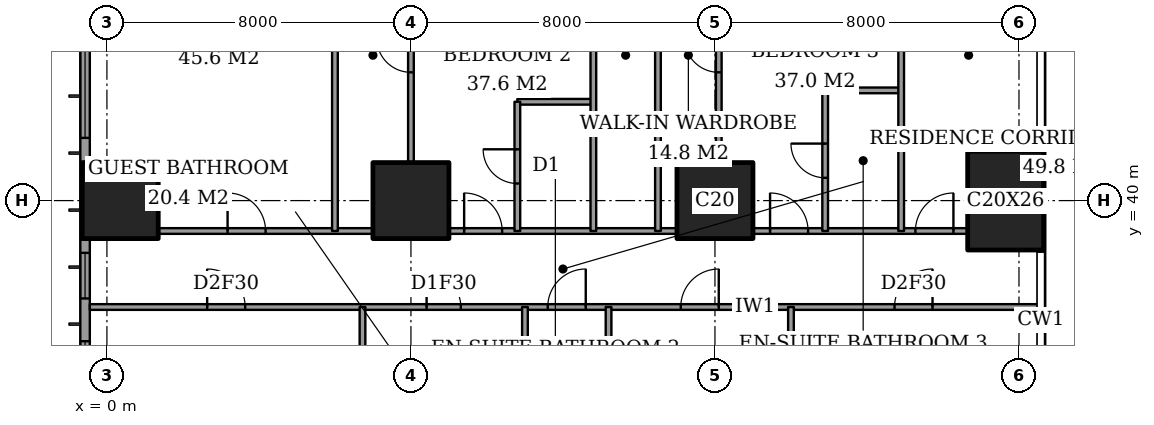
"""IFC4 building model, lengths in metres.
Left out: names, types, materials, properties, quantities, classifications, styles, units other than length and angle.
Written with IfcOpenShell. Run it as: python <this file> out.ifc"""

import sys

from ifc_helpers import new_model, si_unit, direction, frame, frame_2d, origin, origin_2d, place, context, subcontext, project, spatial, rectangle, extrude, element, fill, save


model = new_model("IFC4")
c1 = context("Model", 3, precision=1e-05, world=origin(), true_north=direction((0.0, 1.0)))
c2 = subcontext(c1, "Body", "Model", "MODEL_VIEW")
j1 = project(units=[si_unit("LENGTHUNIT", "METRE"), si_unit("PLANEANGLEUNIT", "RADIAN")], contexts=[c1])
p1 = place(None, origin())
s1 = spatial("IfcSite", under=j1, at=p1, CompositionType="ELEMENT")
p2 = place(p1, origin())
s2 = spatial("IfcBuilding", under=s1, at=p2, CompositionType="ELEMENT")
p3 = place(p2, frame((0.0, 0.0, 114.2)))
s3 = spatial("IfcBuildingStorey", under=s2, at=p3, CompositionType="ELEMENT", Elevation=114.2)
for number, where, z_axis, x_axis in (
    (1, (0.35, 40.0, 0.0), (0.0, 0.0, 1.0), (1.0, 0.0, 0.0)),
    (2, (8.0, 40.0, 0.0), (0.0, 0.0, 1.0), (1.0, 0.0, 0.0)),
    (3, (16.0, 40.0, 0.0), (0.0, 0.0, 1.0), (1.0, 0.0, 0.0)),
):
    element("IfcColumn", number, at=place(p3, frame(where, z_axis=z_axis, x_axis=x_axis)), inside=s3, PredefinedType="COLUMN", context=c2, shape_type="SweptSolid", body=[
        extrude(rectangle(XDim=2.0, YDim=2.0, at=origin_2d()), origin(), (0.0, 0.0, 1.0), 3.6),
    ])
p4 = place(p3, frame((23.65, 40.0, 0.0), z_axis=(0.0, 0.0, 1.0), x_axis=(1.0, 0.0, 0.0)))
e4 = element("IfcColumn", 4, at=p4, inside=s3, PredefinedType="COLUMN", context=c2, shape_type="SweptSolid", body=[
    extrude(rectangle(XDim=2.0, YDim=2.6, at=origin_2d()), origin(), (0.0, 0.0, 1.0), 3.6),
])
p5 = place(p3, frame((-0.575, 44.825, 0.0), z_axis=(0.0, 0.0, 1.0), x_axis=(0.0, -1.0, 0.0)))
e5 = element("IfcWall", 5, at=p5, inside=s3, PredefinedType="SOLIDWALL", context=c2, shape_type="SweptSolid", body=[
    extrude(rectangle(XDim=41.65, YDim=0.25, at=frame_2d((20.825, 0.0))), origin(), (0.0, 0.0, 1.0), 3.6),
])
p6 = place(p5, frame((0.775, 0.0, 0.4)))
e6 = element("IfcOpeningElement", 6, at=p6, cuts=e5, PredefinedType="OPENING", context=c2, shape_type="SweptSolid", body=[
    extrude(rectangle(XDim=2.4, YDim=2.2, at=frame_2d((1.2, 1.1))), frame((0.0, 0.135, 0.0), z_axis=(0.0, -1.0, 0.0), x_axis=(1.0, 0.0, 0.0)), (0.0, 0.0, 1.0), 0.27),
])
p7 = place(p5, frame((6.2, 0.0, 0.4)))
e7 = element("IfcOpeningElement", 7, at=p7, cuts=e5, PredefinedType="OPENING", context=c2, shape_type="SweptSolid", body=[
    extrude(rectangle(XDim=1.2, YDim=2.2, at=frame_2d((0.6, 1.1))), frame((0.0, 0.135, 0.0), z_axis=(0.0, -1.0, 0.0), x_axis=(1.0, 0.0, 0.0)), (0.0, 0.0, 1.0), 0.27),
])
p8 = place(p5, frame((8.525, 0.0, 0.4)))
e8 = element("IfcOpeningElement", 8, at=p8, cuts=e5, PredefinedType="OPENING", context=c2, shape_type="SweptSolid", body=[
    extrude(rectangle(XDim=2.4, YDim=2.2, at=frame_2d((1.2, 1.1))), frame((0.0, 0.135, 0.0), z_axis=(0.0, -1.0, 0.0), x_axis=(1.0, 0.0, 0.0)), (0.0, 0.0, 1.0), 0.27),
])
p9 = place(p5, frame((15.625, 0.0, 0.4)))
e9 = element("IfcOpeningElement", 9, at=p9, cuts=e5, PredefinedType="OPENING", context=c2, shape_type="SweptSolid", body=[
    extrude(rectangle(XDim=2.4, YDim=2.2, at=frame_2d((1.2, 1.1))), frame((0.0, 0.135, 0.0), z_axis=(0.0, -1.0, 0.0), x_axis=(1.0, 0.0, 0.0)), (0.0, 0.0, 1.0), 0.27),
])
p10 = place(p5, frame((23.625, 0.0, 0.4)))
e10 = element("IfcOpeningElement", 10, at=p10, cuts=e5, PredefinedType="OPENING", context=c2, shape_type="SweptSolid", body=[
    extrude(rectangle(XDim=2.4, YDim=2.2, at=frame_2d((1.2, 1.1))), frame((0.0, 0.135, 0.0), z_axis=(0.0, -1.0, 0.0), x_axis=(1.0, 0.0, 0.0)), (0.0, 0.0, 1.0), 0.27),
])
p11 = place(p5, frame((30.825, 0.0, 0.4)))
e11 = element("IfcOpeningElement", 11, at=p11, cuts=e5, PredefinedType="OPENING", context=c2, shape_type="SweptSolid", body=[
    extrude(rectangle(XDim=2.4, YDim=2.2, at=frame_2d((1.2, 1.1))), frame((0.0, 0.135, 0.0), z_axis=(0.0, -1.0, 0.0), x_axis=(1.0, 0.0, 0.0)), (0.0, 0.0, 1.0), 0.27),
])
p12 = place(p5, frame((34.5, 0.0, 0.4)))
e12 = element("IfcOpeningElement", 12, at=p12, cuts=e5, PredefinedType="OPENING", context=c2, shape_type="SweptSolid", body=[
    extrude(rectangle(XDim=1.2, YDim=2.2, at=frame_2d((0.6, 1.1))), frame((0.0, 0.135, 0.0), z_axis=(0.0, -1.0, 0.0), x_axis=(1.0, 0.0, 0.0)), (0.0, 0.0, 1.0), 0.27),
])
p13 = place(p5, frame((38.475, 0.0, 0.4)))
e13 = element("IfcOpeningElement", 13, at=p13, cuts=e5, PredefinedType="OPENING", context=c2, shape_type="SweptSolid", body=[
    extrude(rectangle(XDim=2.4, YDim=2.2, at=frame_2d((1.2, 1.1))), frame((0.0, 0.135, 0.0), z_axis=(0.0, -1.0, 0.0), x_axis=(1.0, 0.0, 0.0)), (0.0, 0.0, 1.0), 0.27),
])
p14 = place(p3, frame((-0.45, 37.2, 0.0), z_axis=(0.0, 0.0, 1.0), x_axis=(1.0, 0.0, 0.0)))
e14 = element("IfcWall", 14, at=p14, inside=s3, PredefinedType="PARTITIONING", context=c2, shape_type="SweptSolid", body=[
    extrude(rectangle(XDim=25.011, YDim=0.15, at=frame_2d((12.505, 0.0))), origin(), (0.0, 0.0, 1.0), 3.35),
])
p15 = place(p14, frame((12.05, 0.0, 0.0)))
e15 = element("IfcOpeningElement", 15, at=p15, cuts=e14, PredefinedType="OPENING", context=c2, shape_type="SweptSolid", body=[
    extrude(rectangle(XDim=1.0, YDim=2.1, at=frame_2d((0.5, 1.05))), frame((0.0, 0.085, 0.0), z_axis=(0.0, -1.0, 0.0), x_axis=(1.0, 0.0, 0.0)), (0.0, 0.0, 1.0), 0.17),
])
p16 = place(p14, frame((3.087, 0.0, 0.0)))
e16 = element("IfcOpeningElement", 16, at=p16, cuts=e14, PredefinedType="OPENING", context=c2, shape_type="SweptSolid", body=[
    extrude(rectangle(XDim=1.0, YDim=2.1, at=frame_2d((0.5, 1.05))), frame((0.0, 0.085, 0.0), z_axis=(0.0, -1.0, 0.0), x_axis=(1.0, 0.0, 0.0)), (0.0, 0.0, 1.0), 0.17),
])
p17 = place(p14, frame((8.863, 0.0, 0.0)))
e17 = element("IfcOpeningElement", 17, at=p17, cuts=e14, PredefinedType="OPENING", context=c2, shape_type="SweptSolid", body=[
    extrude(rectangle(XDim=0.9, YDim=2.1, at=frame_2d((0.45, 1.05))), frame((0.0, 0.085, 0.0), z_axis=(0.0, -1.0, 0.0), x_axis=(1.0, 0.0, 0.0)), (0.0, 0.0, 1.0), 0.17),
])
p18 = place(p14, frame((15.55, 0.0, 0.0)))
e18 = element("IfcOpeningElement", 18, at=p18, cuts=e14, PredefinedType="OPENING", context=c2, shape_type="SweptSolid", body=[
    extrude(rectangle(XDim=1.0, YDim=2.1, at=frame_2d((0.5, 1.05))), frame((0.0, 0.085, 0.0), z_axis=(0.0, -1.0, 0.0), x_axis=(1.0, 0.0, 0.0)), (0.0, 0.0, 1.0), 0.17),
])
p19 = place(p14, frame((21.175, 0.0, 0.0)))
e19 = element("IfcOpeningElement", 19, at=p19, cuts=e14, PredefinedType="OPENING", context=c2, shape_type="SweptSolid", body=[
    extrude(rectangle(XDim=1.0, YDim=2.1, at=frame_2d((0.5, 1.05))), frame((0.0, 0.085, 0.0), z_axis=(0.0, -1.0, 0.0), x_axis=(1.0, 0.0, 0.0)), (0.0, 0.0, 1.0), 0.17),
])
p20 = place(p3, frame((1.35, 39.2, 0.0), z_axis=(0.0, 0.0, 1.0), x_axis=(1.0, 0.0, 0.0)))
e20 = element("IfcWall", 20, at=p20, inside=s3, PredefinedType="PARTITIONING", context=c2, shape_type="SweptSolid", body=[
    extrude(rectangle(XDim=5.65, YDim=0.15, at=frame_2d((2.825, 0.0))), origin(), (0.0, 0.0, 1.0), 3.35),
])
p21 = place(p20, frame((1.825, 0.0, 0.0)))
e21 = element("IfcOpeningElement", 21, at=p21, cuts=e20, PredefinedType="OPENING", context=c2, shape_type="SweptSolid", body=[
    extrude(rectangle(XDim=1.0, YDim=2.1, at=frame_2d((0.5, 1.05))), frame((0.0, 0.085, 0.0), z_axis=(0.0, -1.0, 0.0), x_axis=(1.0, 0.0, 0.0)), (0.0, 0.0, 1.0), 0.17),
])
p22 = place(p3, frame((9.0, 39.2, 0.0), z_axis=(0.0, 0.0, 1.0), x_axis=(1.0, 0.0, 0.0)))
e22 = element("IfcWall", 22, at=p22, inside=s3, PredefinedType="PARTITIONING", context=c2, shape_type="SweptSolid", body=[
    extrude(rectangle(XDim=6.0, YDim=0.15, at=frame_2d((3.0, 0.0))), origin(), (0.0, 0.0, 1.0), 3.35),
])
p23 = place(p22, frame((0.4, 0.0, 0.0)))
e23 = element("IfcOpeningElement", 23, at=p23, cuts=e22, PredefinedType="OPENING", context=c2, shape_type="SweptSolid", body=[
    extrude(rectangle(XDim=1.0, YDim=2.1, at=frame_2d((0.5, 1.05))), frame((0.0, 0.085, 0.0), z_axis=(0.0, -1.0, 0.0), x_axis=(1.0, 0.0, 0.0)), (0.0, 0.0, 1.0), 0.17),
])
p24 = place(p3, frame((17.0, 39.2, 0.0), z_axis=(0.0, 0.0, 1.0), x_axis=(1.0, 0.0, 0.0)))
e24 = element("IfcWall", 24, at=p24, inside=s3, PredefinedType="PARTITIONING", context=c2, shape_type="SweptSolid", body=[
    extrude(rectangle(XDim=5.65, YDim=0.15, at=frame_2d((2.825, 0.0))), origin(), (0.0, 0.0, 1.0), 3.35),
])
p25 = place(p24, frame((0.45, 0.0, 0.0)))
e25 = element("IfcOpeningElement", 25, at=p25, cuts=e24, PredefinedType="OPENING", context=c2, shape_type="SweptSolid", body=[
    extrude(rectangle(XDim=1.0, YDim=2.1, at=frame_2d((0.5, 1.05))), frame((0.0, 0.085, 0.0), z_axis=(0.0, -1.0, 0.0), x_axis=(1.0, 0.0, 0.0)), (0.0, 0.0, 1.0), 0.17),
])
p26 = place(p24, frame((4.275, 0.0, 0.0)))
e26 = element("IfcOpeningElement", 26, at=p26, cuts=e24, PredefinedType="OPENING", context=c2, shape_type="SweptSolid", body=[
    extrude(rectangle(XDim=1.0, YDim=2.1, at=frame_2d((0.5, 1.05))), frame((0.0, 0.085, 0.0), z_axis=(0.0, -1.0, 0.0), x_axis=(1.0, 0.0, 0.0)), (0.0, 0.0, 1.0), 0.17),
])
for number, where, z_axis, x_axis in (
    (27, (10.8, 42.6, 0.0), (0.0, 0.0, 1.0), (1.0, 0.0, 0.0)),
    (28, (18.9, 42.9, 0.0), (0.0, 0.0, 1.0), (1.0, 0.0, 0.0)),
):
    element("IfcWall", number, at=place(p3, frame(where, z_axis=z_axis, x_axis=x_axis)), inside=s3, PredefinedType="PARTITIONING", context=c2, shape_type="SweptSolid", body=[
        extrude(rectangle(XDim=2.0, YDim=0.15, at=frame_2d((1.0, 0.0))), origin(), (0.0, 0.0, 1.0), 3.35),
    ])
p27 = place(p3, frame((6.0, 39.2, 0.0), z_axis=(0.0, 0.0, 1.0), x_axis=(0.0, 1.0, 0.0)))
e29 = element("IfcWall", 29, at=p27, inside=s3, PredefinedType="PARTITIONING", context=c2, shape_type="SweptSolid", body=[
    extrude(rectangle(XDim=9.25, YDim=0.15, at=frame_2d((4.625, 0.0))), origin(), (0.0, 0.0, 1.0), 3.35),
])
p28 = place(p3, frame((6.725, 33.2, 0.0), z_axis=(0.0, 0.0, 1.0), x_axis=(0.0, 1.0, 0.0)))
e30 = element("IfcWall", 30, at=p28, inside=s3, PredefinedType="PARTITIONING", context=c2, shape_type="SweptSolid", body=[
    extrude(rectangle(XDim=4.0, YDim=0.15, at=frame_2d((2.0, 0.0))), origin(), (0.0, 0.0, 1.0), 3.35),
])
p29 = place(p3, frame((8.0, 41.0, 0.0), z_axis=(0.0, 0.0, 1.0), x_axis=(0.0, 1.0, 0.0)))
e31 = element("IfcWall", 31, at=p29, inside=s3, PredefinedType="PARTITIONING", context=c2, shape_type="SweptSolid", body=[
    extrude(rectangle(XDim=5.65, YDim=0.15, at=frame_2d((2.825, 0.0))), origin(), (0.0, 0.0, 1.0), 3.35),
])
p30 = place(p29, frame((2.375, 0.0, 0.0)))
e32 = element("IfcOpeningElement", 32, at=p30, cuts=e31, PredefinedType="OPENING", context=c2, shape_type="SweptSolid", body=[
    extrude(rectangle(XDim=0.9, YDim=2.1, at=frame_2d((0.45, 1.05))), frame((0.0, 0.085, 0.0), z_axis=(0.0, -1.0, 0.0), x_axis=(1.0, 0.0, 0.0)), (0.0, 0.0, 1.0), 0.17),
])
p31 = place(p3, frame((10.8, 39.2, 0.0), z_axis=(0.0, 0.0, 1.0), x_axis=(0.0, 1.0, 0.0)))
e33 = element("IfcWall", 33, at=p31, inside=s3, PredefinedType="PARTITIONING", context=c2, shape_type="SweptSolid", body=[
    extrude(rectangle(XDim=3.4, YDim=0.15, at=frame_2d((1.7, 0.0))), origin(), (0.0, 0.0, 1.0), 3.35),
])
p32 = place(p31, frame((1.25, 0.0, 0.0)))
e34 = element("IfcOpeningElement", 34, at=p32, cuts=e33, PredefinedType="OPENING", context=c2, shape_type="SweptSolid", body=[
    extrude(rectangle(XDim=0.9, YDim=2.1, at=frame_2d((0.45, 1.05))), frame((0.0, 0.085, 0.0), z_axis=(0.0, -1.0, 0.0), x_axis=(1.0, 0.0, 0.0)), (0.0, 0.0, 1.0), 0.17),
])
p33 = place(p3, frame((11.0, 28.0, 0.0), z_axis=(0.0, 0.0, 1.0), x_axis=(0.0, 1.0, 0.0)))
e35 = element("IfcWall", 35, at=p33, inside=s3, PredefinedType="PARTITIONING", context=c2, shape_type="SweptSolid", body=[
    extrude(rectangle(XDim=9.2, YDim=0.15, at=frame_2d((4.6, 0.0))), origin(), (0.0, 0.0, 1.0), 3.35),
])
p34 = place(p33, frame((0.837, 0.0, 0.0)))
e36 = element("IfcOpeningElement", 36, at=p34, cuts=e35, PredefinedType="OPENING", context=c2, shape_type="SweptSolid", body=[
    extrude(rectangle(XDim=1.0, YDim=2.1, at=frame_2d((0.5, 1.05))), frame((0.0, 0.085, 0.0), z_axis=(0.0, -1.0, 0.0), x_axis=(1.0, 0.0, 0.0)), (0.0, 0.0, 1.0), 0.17),
])
p35 = place(p3, frame((12.8, 39.2, 0.0), z_axis=(0.0, 0.0, 1.0), x_axis=(0.0, 1.0, 0.0)))
e37 = element("IfcWall", 37, at=p35, inside=s3, PredefinedType="PARTITIONING", context=c2, shape_type="SweptSolid", body=[
    extrude(rectangle(XDim=9.25, YDim=0.15, at=frame_2d((4.625, 0.0))), origin(), (0.0, 0.0, 1.0), 3.35),
])
p36 = place(p35, frame((5.875, 0.0, 0.0)))
e38 = element("IfcOpeningElement", 38, at=p36, cuts=e37, PredefinedType="OPENING", context=c2, shape_type="SweptSolid", body=[
    extrude(rectangle(XDim=0.9, YDim=2.1, at=frame_2d((0.45, 1.05))), frame((0.0, 0.085, 0.0), z_axis=(0.0, -1.0, 0.0), x_axis=(1.0, 0.0, 0.0)), (0.0, 0.0, 1.0), 0.17),
])
p37 = place(p3, frame((13.2, 30.675, 0.0), z_axis=(0.0, 0.0, 1.0), x_axis=(0.0, 1.0, 0.0)))
e39 = element("IfcWall", 39, at=p37, inside=s3, PredefinedType="PARTITIONING", context=c2, shape_type="SweptSolid", body=[
    extrude(rectangle(XDim=6.525, YDim=0.15, at=frame_2d((3.262, 0.0))), origin(), (0.0, 0.0, 1.0), 3.35),
])
p38 = place(p3, frame((14.5, 39.2, 0.0), z_axis=(0.0, 0.0, 1.0), x_axis=(0.0, 1.0, 0.0)))
e40 = element("IfcWall", 40, at=p38, inside=s3, PredefinedType="PARTITIONING", context=c2, shape_type="SweptSolid", body=[
    extrude(rectangle(XDim=9.25, YDim=0.15, at=frame_2d((4.625, 0.0))), origin(), (0.0, 0.0, 1.0), 3.35),
])
p39 = place(p3, frame((16.1, 41.0, 0.0), z_axis=(0.0, 0.0, 1.0), x_axis=(0.0, 1.0, 0.0)))
e41 = element("IfcWall", 41, at=p39, inside=s3, PredefinedType="PARTITIONING", context=c2, shape_type="SweptSolid", body=[
    extrude(rectangle(XDim=5.65, YDim=0.15, at=frame_2d((2.825, 0.0))), origin(), (0.0, 0.0, 1.0), 3.35),
])
p40 = place(p39, frame((2.375, 0.0, 0.0)))
e42 = element("IfcOpeningElement", 42, at=p40, cuts=e41, PredefinedType="OPENING", context=c2, shape_type="SweptSolid", body=[
    extrude(rectangle(XDim=0.9, YDim=2.1, at=frame_2d((0.45, 1.05))), frame((0.0, 0.085, 0.0), z_axis=(0.0, -1.0, 0.0), x_axis=(1.0, 0.0, 0.0)), (0.0, 0.0, 1.0), 0.17),
])
p41 = place(p3, frame((18.0, 28.0, 0.0), z_axis=(0.0, 0.0, 1.0), x_axis=(0.0, 1.0, 0.0)))
e43 = element("IfcWall", 43, at=p41, inside=s3, PredefinedType="PARTITIONING", context=c2, shape_type="SweptSolid", body=[
    extrude(rectangle(XDim=9.2, YDim=0.15, at=frame_2d((4.6, 0.0))), origin(), (0.0, 0.0, 1.0), 3.35),
])
p42 = place(p41, frame((0.837, 0.0, 0.0)))
e44 = element("IfcOpeningElement", 44, at=p42, cuts=e43, PredefinedType="OPENING", context=c2, shape_type="SweptSolid", body=[
    extrude(rectangle(XDim=1.0, YDim=2.1, at=frame_2d((0.5, 1.05))), frame((0.0, 0.085, 0.0), z_axis=(0.0, -1.0, 0.0), x_axis=(1.0, 0.0, 0.0)), (0.0, 0.0, 1.0), 0.17),
])
p43 = place(p3, frame((18.9, 39.2, 0.0), z_axis=(0.0, 0.0, 1.0), x_axis=(0.0, 1.0, 0.0)))
e45 = element("IfcWall", 45, at=p43, inside=s3, PredefinedType="PARTITIONING", context=c2, shape_type="SweptSolid", body=[
    extrude(rectangle(XDim=3.7, YDim=0.15, at=frame_2d((1.85, 0.0))), origin(), (0.0, 0.0, 1.0), 3.35),
])
p44 = place(p43, frame((1.4, 0.0, 0.0)))
e46 = element("IfcOpeningElement", 46, at=p44, cuts=e45, PredefinedType="OPENING", context=c2, shape_type="SweptSolid", body=[
    extrude(rectangle(XDim=0.9, YDim=2.1, at=frame_2d((0.45, 1.05))), frame((0.0, 0.085, 0.0), z_axis=(0.0, -1.0, 0.0), x_axis=(1.0, 0.0, 0.0)), (0.0, 0.0, 1.0), 0.17),
])
p45 = place(p3, frame((20.9, 39.2, 0.0), z_axis=(0.0, 0.0, 1.0), x_axis=(0.0, 1.0, 0.0)))
e47 = element("IfcWall", 47, at=p45, inside=s3, PredefinedType="PARTITIONING", context=c2, shape_type="SweptSolid", body=[
    extrude(rectangle(XDim=9.25, YDim=0.15, at=frame_2d((4.625, 0.0))), origin(), (0.0, 0.0, 1.0), 3.35),
])
p46 = place(p6, origin())
e48 = element("IfcWindow", 48, at=p46, inside=s3, PartitioningType="SINGLE_PANEL", PredefinedType="WINDOW", context=c2, shape_type="SweptSolid", body=[
    extrude(rectangle(XDim=2.4, YDim=2.2, at=frame_2d((1.2, 1.1))), frame((0.0, 0.03, 0.0), z_axis=(0.0, -1.0, 0.0), x_axis=(1.0, 0.0, 0.0)), (0.0, 0.0, 1.0), 0.06),
])
fill(e6, e48)
p47 = place(p7, origin())
e49 = element("IfcWindow", 49, at=p47, inside=s3, PartitioningType="SINGLE_PANEL", PredefinedType="WINDOW", context=c2, shape_type="SweptSolid", body=[
    extrude(rectangle(XDim=1.2, YDim=2.2, at=frame_2d((0.6, 1.1))), frame((0.0, 0.03, 0.0), z_axis=(0.0, -1.0, 0.0), x_axis=(1.0, 0.0, 0.0)), (0.0, 0.0, 1.0), 0.06),
])
fill(e7, e49)
p48 = place(p8, origin())
e50 = element("IfcWindow", 50, at=p48, inside=s3, PartitioningType="SINGLE_PANEL", PredefinedType="WINDOW", context=c2, shape_type="SweptSolid", body=[
    extrude(rectangle(XDim=2.4, YDim=2.2, at=frame_2d((1.2, 1.1))), frame((0.0, 0.03, 0.0), z_axis=(0.0, -1.0, 0.0), x_axis=(1.0, 0.0, 0.0)), (0.0, 0.0, 1.0), 0.06),
])
fill(e8, e50)
p49 = place(p21, origin())
e51 = element("IfcDoor", 51, at=p49, inside=s3, OperationType="SINGLE_SWING_RIGHT", PredefinedType="DOOR", context=c2, shape_type="SweptSolid", body=[
    extrude(rectangle(XDim=1.0, YDim=2.1, at=frame_2d((0.5, 1.05))), frame((0.0, 0.025, 0.0), z_axis=(0.0, -1.0, 0.0), x_axis=(1.0, 0.0, 0.0)), (0.0, 0.0, 1.0), 0.05),
])
fill(e21, e51)
p50 = place(p30, origin())
e52 = element("IfcDoor", 52, at=p50, inside=s3, OperationType="SINGLE_SWING_LEFT", PredefinedType="DOOR", context=c2, shape_type="SweptSolid", body=[
    extrude(rectangle(XDim=0.9, YDim=2.1, at=frame_2d((0.45, 1.05))), frame((0.0, 0.025, 0.0), z_axis=(0.0, -1.0, 0.0), x_axis=(1.0, 0.0, 0.0)), (0.0, 0.0, 1.0), 0.05),
])
fill(e32, e52)
p51 = place(p32, origin())
e53 = element("IfcDoor", 53, at=p51, inside=s3, OperationType="SINGLE_SWING_LEFT", PredefinedType="DOOR", context=c2, shape_type="SweptSolid", body=[
    extrude(rectangle(XDim=0.9, YDim=2.1, at=frame_2d((0.45, 1.05))), frame((0.0, 0.025, 0.0), z_axis=(0.0, -1.0, 0.0), x_axis=(1.0, 0.0, 0.0)), (0.0, 0.0, 1.0), 0.05),
])
fill(e34, e53)
p52 = place(p23, origin())
e54 = element("IfcDoor", 54, at=p52, inside=s3, OperationType="SINGLE_SWING_RIGHT", PredefinedType="DOOR", context=c2, shape_type="SweptSolid", body=[
    extrude(rectangle(XDim=1.0, YDim=2.1, at=frame_2d((0.5, 1.05))), frame((0.0, 0.025, 0.0), z_axis=(0.0, -1.0, 0.0), x_axis=(1.0, 0.0, 0.0)), (0.0, 0.0, 1.0), 0.05),
])
fill(e23, e54)
p53 = place(p40, origin())
e55 = element("IfcDoor", 55, at=p53, inside=s3, OperationType="SINGLE_SWING_LEFT", PredefinedType="DOOR", context=c2, shape_type="SweptSolid", body=[
    extrude(rectangle(XDim=0.9, YDim=2.1, at=frame_2d((0.45, 1.05))), frame((0.0, 0.025, 0.0), z_axis=(0.0, -1.0, 0.0), x_axis=(1.0, 0.0, 0.0)), (0.0, 0.0, 1.0), 0.05),
])
fill(e42, e55)
p54 = place(p44, origin())
e56 = element("IfcDoor", 56, at=p54, inside=s3, OperationType="SINGLE_SWING_LEFT", PredefinedType="DOOR", context=c2, shape_type="SweptSolid", body=[
    extrude(rectangle(XDim=0.9, YDim=2.1, at=frame_2d((0.45, 1.05))), frame((0.0, 0.025, 0.0), z_axis=(0.0, -1.0, 0.0), x_axis=(1.0, 0.0, 0.0)), (0.0, 0.0, 1.0), 0.05),
])
fill(e46, e56)
p55 = place(p25, origin())
e57 = element("IfcDoor", 57, at=p55, inside=s3, OperationType="SINGLE_SWING_RIGHT", PredefinedType="DOOR", context=c2, shape_type="SweptSolid", body=[
    extrude(rectangle(XDim=1.0, YDim=2.1, at=frame_2d((0.5, 1.05))), frame((0.0, 0.025, 0.0), z_axis=(0.0, -1.0, 0.0), x_axis=(1.0, 0.0, 0.0)), (0.0, 0.0, 1.0), 0.05),
])
fill(e25, e57)
p56 = place(p26, origin())
e58 = element("IfcDoor", 58, at=p56, inside=s3, OperationType="SINGLE_SWING_LEFT", PredefinedType="DOOR", context=c2, shape_type="SweptSolid", body=[
    extrude(rectangle(XDim=1.0, YDim=2.1, at=frame_2d((0.5, 1.05))), frame((0.0, 0.025, 0.0), z_axis=(0.0, -1.0, 0.0), x_axis=(1.0, 0.0, 0.0)), (0.0, 0.0, 1.0), 0.05),
])
fill(e26, e58)
p57 = place(p15, origin())
e59 = element("IfcDoor", 59, at=p57, inside=s3, OperationType="SINGLE_SWING_LEFT", PredefinedType="DOOR", context=c2, shape_type="SweptSolid", body=[
    extrude(rectangle(XDim=1.0, YDim=2.1, at=frame_2d((0.5, 1.05))), frame((0.0, 0.025, 0.0), z_axis=(0.0, -1.0, 0.0), x_axis=(1.0, 0.0, 0.0)), (0.0, 0.0, 1.0), 0.05),
])
fill(e15, e59)
p58 = place(p16, origin())
e60 = element("IfcDoor", 60, at=p58, inside=s3, OperationType="SINGLE_SWING_RIGHT", PredefinedType="DOOR", context=c2, shape_type="SweptSolid", body=[
    extrude(rectangle(XDim=1.0, YDim=2.1, at=frame_2d((0.5, 1.05))), frame((0.0, 0.025, 0.0), z_axis=(0.0, -1.0, 0.0), x_axis=(1.0, 0.0, 0.0)), (0.0, 0.0, 1.0), 0.05),
])
fill(e16, e60)
p59 = place(p17, origin())
e61 = element("IfcDoor", 61, at=p59, inside=s3, OperationType="SINGLE_SWING_RIGHT", PredefinedType="DOOR", context=c2, shape_type="SweptSolid", body=[
    extrude(rectangle(XDim=0.9, YDim=2.1, at=frame_2d((0.45, 1.05))), frame((0.0, 0.025, 0.0), z_axis=(0.0, -1.0, 0.0), x_axis=(1.0, 0.0, 0.0)), (0.0, 0.0, 1.0), 0.05),
])
fill(e17, e61)
p60 = place(p18, origin())
e62 = element("IfcDoor", 62, at=p60, inside=s3, OperationType="SINGLE_SWING_LEFT", PredefinedType="DOOR", context=c2, shape_type="SweptSolid", body=[
    extrude(rectangle(XDim=1.0, YDim=2.1, at=frame_2d((0.5, 1.05))), frame((0.0, 0.025, 0.0), z_axis=(0.0, -1.0, 0.0), x_axis=(1.0, 0.0, 0.0)), (0.0, 0.0, 1.0), 0.05),
])
fill(e18, e62)
p61 = place(p19, origin())
e63 = element("IfcDoor", 63, at=p61, inside=s3, OperationType="SINGLE_SWING_LEFT", PredefinedType="DOOR", context=c2, shape_type="SweptSolid", body=[
    extrude(rectangle(XDim=1.0, YDim=2.1, at=frame_2d((0.5, 1.05))), frame((0.0, 0.025, 0.0), z_axis=(0.0, -1.0, 0.0), x_axis=(1.0, 0.0, 0.0)), (0.0, 0.0, 1.0), 0.05),
])
fill(e19, e63)
save(model, sys.argv[1])
